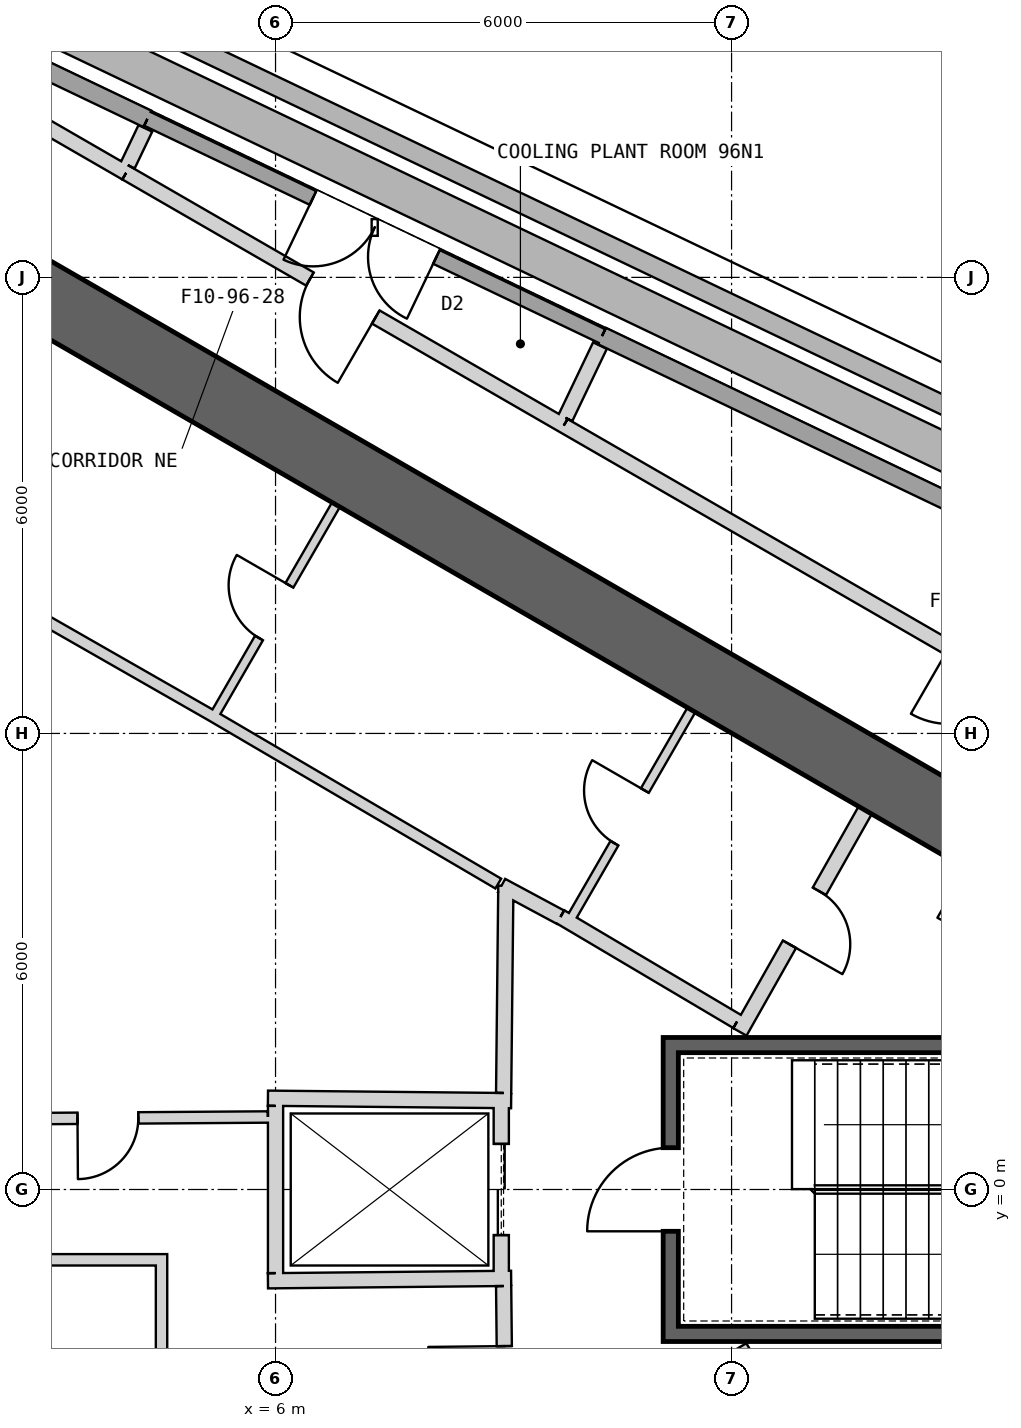
"""IFC4 building model, lengths in metres.
Left out: names, types, materials, properties, quantities, classifications, styles, units other than length and angle.
Written with IfcOpenShell. Run it as: python <this file> out.ifc"""

import sys

from ifc_helpers import new_model, si_unit, direction, frame, frame_2d, origin, place, context, subcontext, project, spatial, rectangle, extrude, element, fill, save


model = new_model("IFC4")
c1 = context("Model", 3, precision=1e-05, world=origin(), true_north=direction((0.0, 1.0)))
c2 = subcontext(c1, "Body", "Model", "MODEL_VIEW")
j1 = project(units=[si_unit("LENGTHUNIT", "METRE"), si_unit("PLANEANGLEUNIT", "RADIAN")], contexts=[c1])
p1 = place(None, origin())
s1 = spatial("IfcSite", under=j1, at=p1, CompositionType="ELEMENT")
p2 = place(p1, origin())
s2 = spatial("IfcBuilding", under=s1, at=p2, CompositionType="ELEMENT")
p3 = place(p2, frame((0.0, 0.0, 425.3)))
s3 = spatial("IfcBuildingStorey", under=s2, at=p3, CompositionType="ELEMENT", Elevation=425.3)
p4 = place(p3, frame((19.475, 2.208, 0.0), z_axis=(0.0, 0.0, 1.0), x_axis=(-0.866028369851, 0.499994862586, 0.0)))
e1 = element("IfcWall", 1, at=p4, inside=s3, PredefinedType="SHEAR", context=c2, shape_type="SweptSolid", body=[
    extrude(rectangle(XDim=31.523, YDim=0.9, at=frame_2d((15.762, 0.0))), origin(), (0.0, 0.0, 1.0), 5.0),
])
p5 = place(p4, frame((3.612, 0.0, 0.0)))
e2 = element("IfcOpeningElement", 2, at=p5, cuts=e1, PredefinedType="OPENING", context=c2, shape_type="SweptSolid", body=[
    extrude(rectangle(XDim=1.2, YDim=2.4, at=frame_2d((0.6, 1.2))), frame((0.0, 0.46, 0.0), z_axis=(0.0, -1.0, 0.0), x_axis=(1.0, 0.0, 0.0)), (0.0, 0.0, 1.0), 0.92),
])
p6 = place(p4, frame((26.712, 0.0, 0.0)))
e3 = element("IfcOpeningElement", 3, at=p6, cuts=e1, PredefinedType="OPENING", context=c2, shape_type="SweptSolid", body=[
    extrude(rectangle(XDim=1.2, YDim=2.4, at=frame_2d((0.6, 1.2))), frame((0.0, 0.46, 0.0), z_axis=(0.0, -1.0, 0.0), x_axis=(1.0, 0.0, 0.0)), (0.0, 0.0, 1.0), 0.92),
])
p7 = place(p3, frame((-7.825, -17.97, 0.0), z_axis=(0.0, 0.0, 1.0), x_axis=(0.866028369851, 0.499994862586, 0.0)))
e4 = element("IfcWall", 4, at=p7, inside=s3, PredefinedType="SHEAR", context=c2, shape_type="SweptSolid", body=[
    extrude(rectangle(XDim=31.523, YDim=0.9, at=frame_2d((15.762, 0.0))), origin(), (0.0, 0.0, 1.0), 5.0),
])
p8 = place(p7, frame((17.862, 0.0, 0.0)))
e5 = element("IfcOpeningElement", 5, at=p8, cuts=e4, PredefinedType="OPENING", context=c2, shape_type="SweptSolid", body=[
    extrude(rectangle(XDim=1.2, YDim=2.4, at=frame_2d((0.6, 1.2))), frame((0.0, 0.46, 0.0), z_axis=(0.0, -1.0, 0.0), x_axis=(1.0, 0.0, 0.0)), (0.0, 0.0, 1.0), 0.92),
])
p9 = place(p7, frame((20.562, 0.0, 0.0)))
e6 = element("IfcOpeningElement", 6, at=p9, cuts=e4, PredefinedType="OPENING", context=c2, shape_type="SweptSolid", body=[
    extrude(rectangle(XDim=1.2, YDim=2.4, at=frame_2d((0.6, 1.2))), frame((0.0, 0.46, 0.0), z_axis=(0.0, -1.0, 0.0), x_axis=(1.0, 0.0, 0.0)), (0.0, 0.0, 1.0), 0.92),
])
p10 = place(p7, frame((26.712, 0.0, 0.0)))
e7 = element("IfcOpeningElement", 7, at=p10, cuts=e4, PredefinedType="OPENING", context=c2, shape_type="SweptSolid", body=[
    extrude(rectangle(XDim=1.2, YDim=2.4, at=frame_2d((0.6, 1.2))), frame((0.0, 0.46, 0.0), z_axis=(0.0, -1.0, 0.0), x_axis=(1.0, 0.0, 0.0)), (0.0, 0.0, 1.0), 0.92),
])
p11 = place(p7, frame((3.612, 0.0, 0.0)))
e8 = element("IfcOpeningElement", 8, at=p11, cuts=e4, PredefinedType="OPENING", context=c2, shape_type="SweptSolid", body=[
    extrude(rectangle(XDim=1.2, YDim=2.4, at=frame_2d((0.6, 1.2))), frame((0.0, 0.46, 0.0), z_axis=(0.0, -1.0, 0.0), x_axis=(1.0, 0.0, 0.0)), (0.0, 0.0, 1.0), 0.92),
])
p12 = place(p3, frame((16.312, 8.353, 0.0), z_axis=(0.0, 0.0, 1.0), x_axis=(-0.902308246331, 0.431091438795, 0.0)))
e9 = element("IfcWall", 9, at=p12, inside=s3, PredefinedType="SOLIDWALL", context=c2, shape_type="SweptSolid", body=[
    extrude(rectangle(XDim=6.668, YDim=0.24, at=frame_2d((3.334, 0.0))), origin(), (0.0, 0.0, 1.0), 4.75),
])
p13 = place(p3, frame((4.314, 14.085, 0.0), z_axis=(0.0, 0.0, 1.0), x_axis=(-0.902315049727, 0.431077198464, 0.0)))
e10 = element("IfcWall", 10, at=p13, inside=s3, PredefinedType="SOLIDWALL", context=c2, shape_type="SweptSolid", body=[
    extrude(rectangle(XDim=6.669, YDim=0.24, at=frame_2d((3.334, 0.0))), origin(), (0.0, 0.0, 1.0), 4.75),
])
p14 = place(p3, frame((10.295, 11.228, 0.0), z_axis=(0.0, 0.0, 1.0), x_axis=(-0.902319256172, 0.431068393577, 0.0)))
e11 = element("IfcWall", 11, at=p14, inside=s3, PredefinedType="SOLIDWALL", context=c2, shape_type="SweptSolid", body=[
    extrude(rectangle(XDim=6.629, YDim=0.2, at=frame_2d((3.314, 0.0))), origin(), (0.0, 0.0, 1.0), 4.75),
])
p15 = place(p14, frame((2.414, 0.0, 0.0)))
e12 = element("IfcOpeningElement", 12, at=p15, cuts=e11, PredefinedType="OPENING", context=c2, shape_type="SweptSolid", body=[
    extrude(rectangle(XDim=1.8, YDim=2.4, at=frame_2d((0.9, 1.2))), frame((0.0, 0.11, 0.0), z_axis=(0.0, -1.0, 0.0), x_axis=(1.0, 0.0, 0.0)), (0.0, 0.0, 1.0), 0.22),
])
p16 = place(p3, frame((-2.057, 18.365, 0.04), z_axis=(0.0, 0.0, 1.0), x_axis=(0.90231764466, -0.431071766804, 0.0)))
e13 = element("IfcWall", 13, at=p16, inside=s3, PredefinedType="PARAPET", context=c2, shape_type="SweptSolid", body=[
    extrude(rectangle(XDim=21.975, YDim=0.25, at=frame_2d((10.987, 0.0))), origin(), (0.0, 0.0, 1.0), 1.2),
])
p17 = place(p3, frame((-1.812, 17.639, 0.04), z_axis=(0.0, 0.0, 1.0), x_axis=(0.902316498724, -0.431074165463, 0.0)))
e14 = element("IfcWall", 14, at=p17, inside=s3, PredefinedType="PARAPET", context=c2, shape_type="SweptSolid", body=[
    extrude(rectangle(XDim=20.799, YDim=0.5, at=frame_2d((10.399, 0.0))), origin(), (0.0, 0.0, 1.0), 0.6),
])
p18 = place(p3, frame((19.2, 1.9, -0.25), z_axis=(0.0, 0.0, 1.0), x_axis=(-1.0, 0.0, 0.0)))
e15 = element("IfcWall", 15, at=p18, inside=s3, PredefinedType="SHEAR", context=c2, shape_type="SweptSolid", body=[
    extrude(rectangle(XDim=8.1, YDim=0.2, at=frame_2d((4.05, 0.0))), origin(), (0.0, 0.0, 1.0), 5.0),
])
p19 = place(p3, frame((11.1, -1.9, -0.25), z_axis=(0.0, 0.0, 1.0), x_axis=(1.0, 0.0, 0.0)))
e16 = element("IfcWall", 16, at=p19, inside=s3, PredefinedType="SHEAR", context=c2, shape_type="SweptSolid", body=[
    extrude(rectangle(XDim=7.9, YDim=0.2, at=frame_2d((3.95, 0.0))), origin(), (0.0, 0.0, 1.0), 5.0),
])
p20 = place(p3, frame((11.2, -1.8, -0.25), z_axis=(0.0, 0.0, 1.0), x_axis=(0.0, 1.0, 0.0)))
e17 = element("IfcWall", 17, at=p20, inside=s3, PredefinedType="SHEAR", context=c2, shape_type="SweptSolid", body=[
    extrude(rectangle(XDim=3.6, YDim=0.2, at=frame_2d((1.8, 0.0))), origin(), (0.0, 0.0, 1.0), 5.0),
])
p21 = place(p20, frame((1.25, 0.0, 0.25)))
e18 = element("IfcOpeningElement", 18, at=p21, cuts=e17, PredefinedType="OPENING", context=c2, shape_type="SweptSolid", body=[
    extrude(rectangle(XDim=1.1, YDim=2.1, at=frame_2d((0.55, 1.05))), frame((0.0, 0.11, 0.0), z_axis=(0.0, -1.0, 0.0), x_axis=(1.0, 0.0, 0.0)), (0.0, 0.0, 1.0), 0.22),
])
p22 = place(p3, frame((8.97, 1.2, 0.0), z_axis=(0.0, 0.0, 1.0), x_axis=(0.0, -1.0, 0.0)))
e19 = element("IfcWall", 19, at=p22, inside=s3, PredefinedType="PLUMBINGWALL", context=c2, shape_type="SweptSolid", body=[
    extrude(rectangle(XDim=2.4, YDim=0.2, at=frame_2d((1.2, 0.0))), origin(), (0.0, 0.0, 1.0), 4.75),
])
p23 = place(p22, frame((0.6, 0.0, 0.0)))
e20 = element("IfcOpeningElement", 20, at=p23, cuts=e19, PredefinedType="OPENING", context=c2, shape_type="SweptSolid", body=[
    extrude(rectangle(XDim=1.2, YDim=2.4, at=frame_2d((0.6, 1.2))), frame((0.0, 0.11, 0.0), z_axis=(0.0, -1.0, 0.0), x_axis=(1.0, 0.0, 0.0)), (0.0, 0.0, 1.0), 0.22),
])
p24 = place(p3, frame((6.0, -1.1, 0.0), z_axis=(0.0, 0.0, 1.0), x_axis=(0.0, 1.0, 0.0)))
e21 = element("IfcWall", 21, at=p24, inside=s3, PredefinedType="PLUMBINGWALL", context=c2, shape_type="SweptSolid", body=[
    extrude(rectangle(XDim=2.2, YDim=0.2, at=frame_2d((1.1, 0.0))), origin(), (0.0, 0.0, 1.0), 4.75),
])
for number, where, z_axis, x_axis in (
    (22, (5.9, 1.201, 0.0), (0.0, 0.0, 1.0), (1.0, -0.01, 0.0)),
    (23, (5.9, -1.201, 0.0), (0.0, 0.0, 1.0), (1.0, 0.01, 0.0)),
):
    element("IfcWall", number, at=place(p3, frame(where, z_axis=z_axis, x_axis=x_axis)), inside=s3, PredefinedType="PLUMBINGWALL", context=c2, shape_type="SweptSolid", body=[
        extrude(rectangle(XDim=3.2, YDim=0.2, at=frame_2d((1.6, 0.0))), origin(), (0.0, 0.0, 1.0), 4.75),
    ])
p25 = place(p3, frame((9.847, 3.495, 0.0), z_axis=(0.0, 0.0, 1.0), x_axis=(0.499984717929, 0.866034226713, 0.0)))
e24 = element("IfcWall", 24, at=p25, inside=s3, PredefinedType="PARTITIONING", context=c2, shape_type="SweptSolid", body=[
    extrude(rectangle(XDim=3.25, YDim=0.12, at=frame_2d((1.625, 0.0))), origin(), (0.0, 0.0, 1.0), 4.75),
])
p26 = place(p25, frame((1.225, 0.0, 0.0)))
e25 = element("IfcOpeningElement", 25, at=p26, cuts=e24, PredefinedType="OPENING", context=c2, shape_type="SweptSolid", body=[
    extrude(rectangle(XDim=0.8, YDim=2.1, at=frame_2d((0.4, 1.05))), frame((0.0, 0.07, 0.0), z_axis=(0.0, -1.0, 0.0), x_axis=(1.0, 0.0, 0.0)), (0.0, 0.0, 1.0), 0.14),
])
p27 = place(p3, frame((12.11, 2.073, 0.0), z_axis=(0.0, 0.0, 1.0), x_axis=(0.49196600604, 0.870614408852, 0.0)))
e26 = element("IfcWall", 26, at=p27, inside=s3, PredefinedType="PARTITIONING", context=c2, shape_type="SweptSolid", body=[
    extrude(rectangle(XDim=3.35, YDim=0.2, at=frame_2d((1.675, 0.0))), origin(), (0.0, 0.0, 1.0), 4.75),
])
p28 = place(p27, frame((1.325, 0.0, 0.0)))
e27 = element("IfcOpeningElement", 27, at=p28, cuts=e26, PredefinedType="OPENING", context=c2, shape_type="SweptSolid", body=[
    extrude(rectangle(XDim=0.8, YDim=2.1, at=frame_2d((0.4, 1.05))), frame((0.0, 0.11, 0.0), z_axis=(0.0, -1.0, 0.0), x_axis=(1.0, 0.0, 0.0)), (0.0, 0.0, 1.0), 0.22),
])
p29 = place(p3, frame((9.75, 3.587, 0.0), z_axis=(0.0, 0.0, 1.0), x_axis=(0.860414880418, -0.509594185166, 0.0)))
e28 = element("IfcWall", 28, at=p29, inside=s3, PredefinedType="PARTITIONING", context=c2, shape_type="SweptSolid", body=[
    extrude(rectangle(XDim=2.7, YDim=0.2, at=frame_2d((1.35, 0.0))), origin(), (0.0, 0.0, 1.0), 4.75),
])
p30 = place(p3, frame((5.17, 6.195, 0.0), z_axis=(0.0, 0.0, 1.0), x_axis=(0.499984717929, 0.866034226713, 0.0)))
e29 = element("IfcWall", 29, at=p30, inside=s3, PredefinedType="PARTITIONING", context=c2, shape_type="SweptSolid", body=[
    extrude(rectangle(XDim=3.25, YDim=0.12, at=frame_2d((1.625, 0.0))), origin(), (0.0, 0.0, 1.0), 4.75),
])
p31 = place(p30, frame((1.225, 0.0, 0.0)))
e30 = element("IfcOpeningElement", 30, at=p31, cuts=e29, PredefinedType="OPENING", context=c2, shape_type="SweptSolid", body=[
    extrude(rectangle(XDim=0.8, YDim=2.1, at=frame_2d((0.4, 1.05))), frame((0.0, 0.07, 0.0), z_axis=(0.0, -1.0, 0.0), x_axis=(1.0, 0.0, 0.0)), (0.0, 0.0, 1.0), 0.14),
])
p32 = place(p3, frame((8.974, 3.999, 0.0), z_axis=(0.0, 0.0, 1.0), x_axis=(0.880917147855, -0.473270513147, 0.0)))
e31 = element("IfcWall", 31, at=p32, inside=s3, PredefinedType="PARTITIONING", context=c2, shape_type="SweptSolid", body=[
    extrude(rectangle(XDim=0.878, YDim=0.2, at=frame_2d((0.439, 0.0))), origin(), (0.0, 0.0, 1.0), 4.75),
])
p33 = place(p3, frame((8.931, 4.025, 0.0), z_axis=(0.0, 0.0, 1.0), x_axis=(-0.862666884027, 0.505772525157, 0.0)))
e32 = element("IfcWall", 32, at=p33, inside=s3, PredefinedType="PLUMBINGWALL", context=c2, shape_type="SweptSolid", body=[
    extrude(rectangle(XDim=4.372, YDim=0.15, at=frame_2d((2.186, 0.0))), origin(), (0.0, 0.0, 1.0), 4.75),
])
p34 = place(p3, frame((5.159, 6.236, 0.0), z_axis=(0.0, 0.0, 1.0), x_axis=(-0.868105023632, 0.496380567654, 0.0)))
e33 = element("IfcWall", 33, at=p34, inside=s3, PredefinedType="PLUMBINGWALL", context=c2, shape_type="SweptSolid", body=[
    extrude(rectangle(XDim=7.072, YDim=0.15, at=frame_2d((3.536, 0.0))), origin(), (0.0, 0.0, 1.0), 4.75),
])
p35 = place(p3, frame((12.245, -2.109, 0.0), z_axis=(0.0, 0.0, 1.0), x_axis=(-0.860414880418, -0.509594185166, 0.0)))
e34 = element("IfcWall", 34, at=p35, inside=s3, PredefinedType="PARTITIONING", context=c2, shape_type="SweptSolid", body=[
    extrude(rectangle(XDim=2.7, YDim=0.2, at=frame_2d((1.35, 0.0))), origin(), (0.0, 0.0, 1.0), 4.75),
])
p36 = place(p3, frame((9.001, 1.27, 0.0), z_axis=(0.0, 0.0, 1.0), x_axis=(0.01074821465, 0.999942236273, 0.0)))
e35 = element("IfcWall", 35, at=p36, inside=s3, PredefinedType="PARTITIONING", context=c2, shape_type="SweptSolid", body=[
    extrude(rectangle(XDim=2.726, YDim=0.2, at=frame_2d((1.363, 0.0))), origin(), (0.0, 0.0, 1.0), 4.75),
])
p37 = place(p3, frame((9.029, -3.851, 0.0), z_axis=(0.0, 0.0, 1.0), x_axis=(-0.010783593937, 0.99994185536, 0.0)))
e36 = element("IfcWall", 36, at=p37, inside=s3, PredefinedType="PARTITIONING", context=c2, shape_type="SweptSolid", body=[
    extrude(rectangle(XDim=2.581, YDim=0.2, at=frame_2d((1.291, 0.0))), origin(), (0.0, 0.0, 1.0), 4.75),
])
p38 = place(p37, frame((0.791, 0.0, 0.0)))
e37 = element("IfcOpeningElement", 37, at=p38, cuts=e36, PredefinedType="OPENING", context=c2, shape_type="SweptSolid", body=[
    extrude(rectangle(XDim=1.0, YDim=2.1, at=frame_2d((0.5, 1.05))), frame((0.0, 0.11, 0.0), z_axis=(0.0, -1.0, 0.0), x_axis=(1.0, 0.0, 0.0)), (0.0, 0.0, 1.0), 0.22),
])
p39 = place(p3, frame((1.561, 0.924, 0.0), z_axis=(0.0, 0.0, 1.0), x_axis=(0.999976441218, 0.006864183077, 0.0)))
e38 = element("IfcWall", 38, at=p39, inside=s3, PredefinedType="PLUMBINGWALL", context=c2, shape_type="SweptSolid", body=[
    extrude(rectangle(XDim=4.339, YDim=0.15, at=frame_2d((2.169, 0.0))), origin(), (0.0, 0.0, 1.0), 4.75),
])
p40 = place(p39, frame((1.833, 0.0, 0.0)))
e39 = element("IfcOpeningElement", 39, at=p40, cuts=e38, PredefinedType="OPENING", context=c2, shape_type="SweptSolid", body=[
    extrude(rectangle(XDim=0.8, YDim=2.1, at=frame_2d((0.4, 1.05))), frame((0.0, 0.085, 0.0), z_axis=(0.0, -1.0, 0.0), x_axis=(1.0, 0.0, 0.0)), (0.0, 0.0, 1.0), 0.17),
])
p41 = place(p3, frame((4.575, -0.925, 0.0), z_axis=(0.0, 0.0, 1.0), x_axis=(-1.0, 0.0, 0.0)))
e40 = element("IfcWall", 40, at=p41, inside=s3, PredefinedType="PLUMBINGWALL", context=c2, shape_type="SweptSolid", body=[
    extrude(rectangle(XDim=2.863, YDim=0.15, at=frame_2d((1.432, 0.0))), origin(), (0.0, 0.0, 1.0), 4.75),
])
p42 = place(p3, frame((4.5, -3.402, 0.0), z_axis=(0.0, 0.0, 1.0), x_axis=(0.0, 1.0, 0.0)))
e41 = element("IfcWall", 41, at=p42, inside=s3, PredefinedType="PLUMBINGWALL", context=c2, shape_type="SweptSolid", body=[
    extrude(rectangle(XDim=2.402, YDim=0.15, at=frame_2d((1.201, 0.0))), origin(), (0.0, 0.0, 1.0), 4.75),
])
p43 = place(p3, frame((20.834, 3.675, 0.0), z_axis=(0.0, 0.0, 1.0), x_axis=(-0.866033490305, 0.499985993474, 0.0)))
e42 = element("IfcWall", 42, at=p43, inside=s3, PredefinedType="PARTITIONING", context=c2, shape_type="SweptSolid", body=[
    extrude(rectangle(XDim=12.75, YDim=0.2, at=frame_2d((6.375, 0.0))), origin(), (0.0, 0.0, 1.0), 4.75),
])
p44 = place(p43, frame((5.9, 0.0, 0.0)))
e43 = element("IfcOpeningElement", 43, at=p44, cuts=e42, PredefinedType="OPENING", context=c2, shape_type="SweptSolid", body=[
    extrude(rectangle(XDim=1.0, YDim=2.1, at=frame_2d((0.5, 1.05))), frame((0.0, 0.11, 0.0), z_axis=(0.0, -1.0, 0.0), x_axis=(1.0, 0.0, 0.0)), (0.0, 0.0, 1.0), 0.22),
])
p45 = place(p3, frame((9.792, 10.05, 0.0), z_axis=(0.0, 0.0, 1.0), x_axis=(-0.866022320763, 0.500005339912, 0.0)))
e44 = element("IfcWall", 44, at=p45, inside=s3, PredefinedType="PARTITIONING", context=c2, shape_type="SweptSolid", body=[
    extrude(rectangle(XDim=6.649, YDim=0.2, at=frame_2d((3.324, 0.0))), origin(), (0.0, 0.0, 1.0), 4.75),
])
p46 = place(p45, frame((2.856, 0.0, 0.0)))
e45 = element("IfcOpeningElement", 45, at=p46, cuts=e44, PredefinedType="OPENING", context=c2, shape_type="SweptSolid", body=[
    extrude(rectangle(XDim=1.0, YDim=2.1, at=frame_2d((0.5, 1.05))), frame((0.0, 0.11, 0.0), z_axis=(0.0, -1.0, 0.0), x_axis=(1.0, 0.0, 0.0)), (0.0, 0.0, 1.0), 0.22),
])
p47 = place(p3, frame((4.034, 13.375, 0.0), z_axis=(0.0, 0.0, 1.0), x_axis=(-0.866024064453, 0.500002319783, 0.0)))
e46 = element("IfcWall", 46, at=p47, inside=s3, PredefinedType="PARTITIONING", context=c2, shape_type="SweptSolid", body=[
    extrude(rectangle(XDim=12.812, YDim=0.2, at=frame_2d((6.406, 0.0))), origin(), (0.0, 0.0, 1.0), 4.75),
])
p48 = place(p47, frame((11.612, 0.0, 0.0)))
e47 = element("IfcOpeningElement", 47, at=p48, cuts=e46, PredefinedType="OPENING", context=c2, shape_type="SweptSolid", body=[
    extrude(rectangle(XDim=1.0, YDim=2.1, at=frame_2d((0.5, 1.05))), frame((0.0, 0.11, 0.0), z_axis=(0.0, -1.0, 0.0), x_axis=(1.0, 0.0, 0.0)), (0.0, 0.0, 1.0), 0.22),
])
p49 = place(p3, frame((10.269, 11.102, 0.0), z_axis=(0.0, 0.0, 1.0), x_axis=(-0.431274891071, -0.902220576318, 0.0)))
e48 = element("IfcWall", 48, at=p49, inside=s3, PredefinedType="PARTITIONING", context=c2, shape_type="SweptSolid", body=[
    extrude(rectangle(XDim=1.052, YDim=0.2, at=frame_2d((0.526, 0.0))), origin(), (0.0, 0.0, 1.0), 4.75),
])
p50 = place(p3, frame((4.057, 13.477, 0.0), z_axis=(0.0, 0.0, 1.0), x_axis=(0.431439342404, 0.902141947714, 0.0)))
e49 = element("IfcWall", 49, at=p50, inside=s3, PredefinedType="PARTITIONING", context=c2, shape_type="SweptSolid", body=[
    extrude(rectangle(XDim=0.535, YDim=0.2, at=frame_2d((0.267, 0.0))), origin(), (0.0, 0.0, 1.0), 4.75),
])
p51 = place(p15, frame((1.8, 0.0, 0.0), z_axis=(0.0, 0.0, 1.0), x_axis=(-1.0, 0.0, 0.0)))
e50 = element("IfcDoor", 50, at=p51, inside=s3, OperationType="SINGLE_SWING_RIGHT", PredefinedType="DOOR", context=c2, shape_type="SweptSolid", body=[
    extrude(rectangle(XDim=1.8, YDim=2.4, at=frame_2d((0.9, 1.2))), frame((0.0, 0.025, 0.0), z_axis=(0.0, -1.0, 0.0), x_axis=(1.0, 0.0, 0.0)), (0.0, 0.0, 1.0), 0.05),
])
fill(e12, e50)
p52 = place(p21, origin())
e51 = element("IfcDoor", 51, at=p52, inside=s3, OperationType="SINGLE_SWING_LEFT", PredefinedType="USERDEFINED", context=c2, shape_type="SweptSolid", body=[
    extrude(rectangle(XDim=1.1, YDim=2.1, at=frame_2d((0.55, 1.05))), frame((0.0, 0.025, 0.0), z_axis=(0.0, -1.0, 0.0), x_axis=(1.0, 0.0, 0.0)), (0.0, 0.0, 1.0), 0.05),
])
fill(e18, e51)
p53 = place(p38, origin())
e52 = element("IfcDoor", 52, at=p53, inside=s3, OperationType="SINGLE_SWING_RIGHT", PredefinedType="USERDEFINED", context=c2, shape_type="SweptSolid", body=[
    extrude(rectangle(XDim=1.0, YDim=2.1, at=frame_2d((0.5, 1.05))), frame((0.0, 0.025, 0.0), z_axis=(0.0, -1.0, 0.0), x_axis=(1.0, 0.0, 0.0)), (0.0, 0.0, 1.0), 0.05),
])
fill(e37, e52)
p54 = place(p23, origin())
e53 = element("IfcDoor", 53, at=p54, inside=s3, OperationType="SLIDING_TO_LEFT", PredefinedType="USERDEFINED", context=c2, shape_type="SweptSolid", body=[
    extrude(rectangle(XDim=1.2, YDim=2.4, at=frame_2d((0.6, 1.2))), frame((0.0, 0.025, 0.0), z_axis=(0.0, -1.0, 0.0), x_axis=(1.0, 0.0, 0.0)), (0.0, 0.0, 1.0), 0.05),
])
fill(e20, e53)
p55 = place(p40, origin())
e54 = element("IfcDoor", 54, at=p55, inside=s3, OperationType="SINGLE_SWING_LEFT", PredefinedType="USERDEFINED", context=c2, shape_type="SweptSolid", body=[
    extrude(rectangle(XDim=0.8, YDim=2.1, at=frame_2d((0.4, 1.05))), frame((0.0, 0.025, 0.0), z_axis=(0.0, -1.0, 0.0), x_axis=(1.0, 0.0, 0.0)), (0.0, 0.0, 1.0), 0.05),
])
fill(e39, e54)
p56 = place(p28, origin())
e55 = element("IfcDoor", 55, at=p56, inside=s3, OperationType="SINGLE_SWING_LEFT", PredefinedType="USERDEFINED", context=c2, shape_type="SweptSolid", body=[
    extrude(rectangle(XDim=0.8, YDim=2.1, at=frame_2d((0.4, 1.05))), frame((0.0, 0.025, 0.0), z_axis=(0.0, -1.0, 0.0), x_axis=(1.0, 0.0, 0.0)), (0.0, 0.0, 1.0), 0.05),
])
fill(e27, e55)
p57 = place(p31, origin())
e56 = element("IfcDoor", 56, at=p57, inside=s3, OperationType="SINGLE_SWING_RIGHT", PredefinedType="USERDEFINED", context=c2, shape_type="SweptSolid", body=[
    extrude(rectangle(XDim=0.8, YDim=2.1, at=frame_2d((0.4, 1.05))), frame((0.0, 0.025, 0.0), z_axis=(0.0, -1.0, 0.0), x_axis=(1.0, 0.0, 0.0)), (0.0, 0.0, 1.0), 0.05),
])
fill(e30, e56)
p58 = place(p46, origin())
e57 = element("IfcDoor", 57, at=p58, inside=s3, OperationType="SINGLE_SWING_LEFT", PredefinedType="USERDEFINED", context=c2, shape_type="SweptSolid", body=[
    extrude(rectangle(XDim=1.0, YDim=2.1, at=frame_2d((0.5, 1.05))), frame((0.0, 0.025, 0.0), z_axis=(0.0, -1.0, 0.0), x_axis=(1.0, 0.0, 0.0)), (0.0, 0.0, 1.0), 0.05),
])
fill(e45, e57)
p59 = place(p26, origin())
e58 = element("IfcDoor", 58, at=p59, inside=s3, OperationType="SINGLE_SWING_RIGHT", PredefinedType="USERDEFINED", context=c2, shape_type="SweptSolid", body=[
    extrude(rectangle(XDim=0.8, YDim=2.1, at=frame_2d((0.4, 1.05))), frame((0.0, 0.025, 0.0), z_axis=(0.0, -1.0, 0.0), x_axis=(1.0, 0.0, 0.0)), (0.0, 0.0, 1.0), 0.05),
])
fill(e25, e58)
save(model, sys.argv[1])
